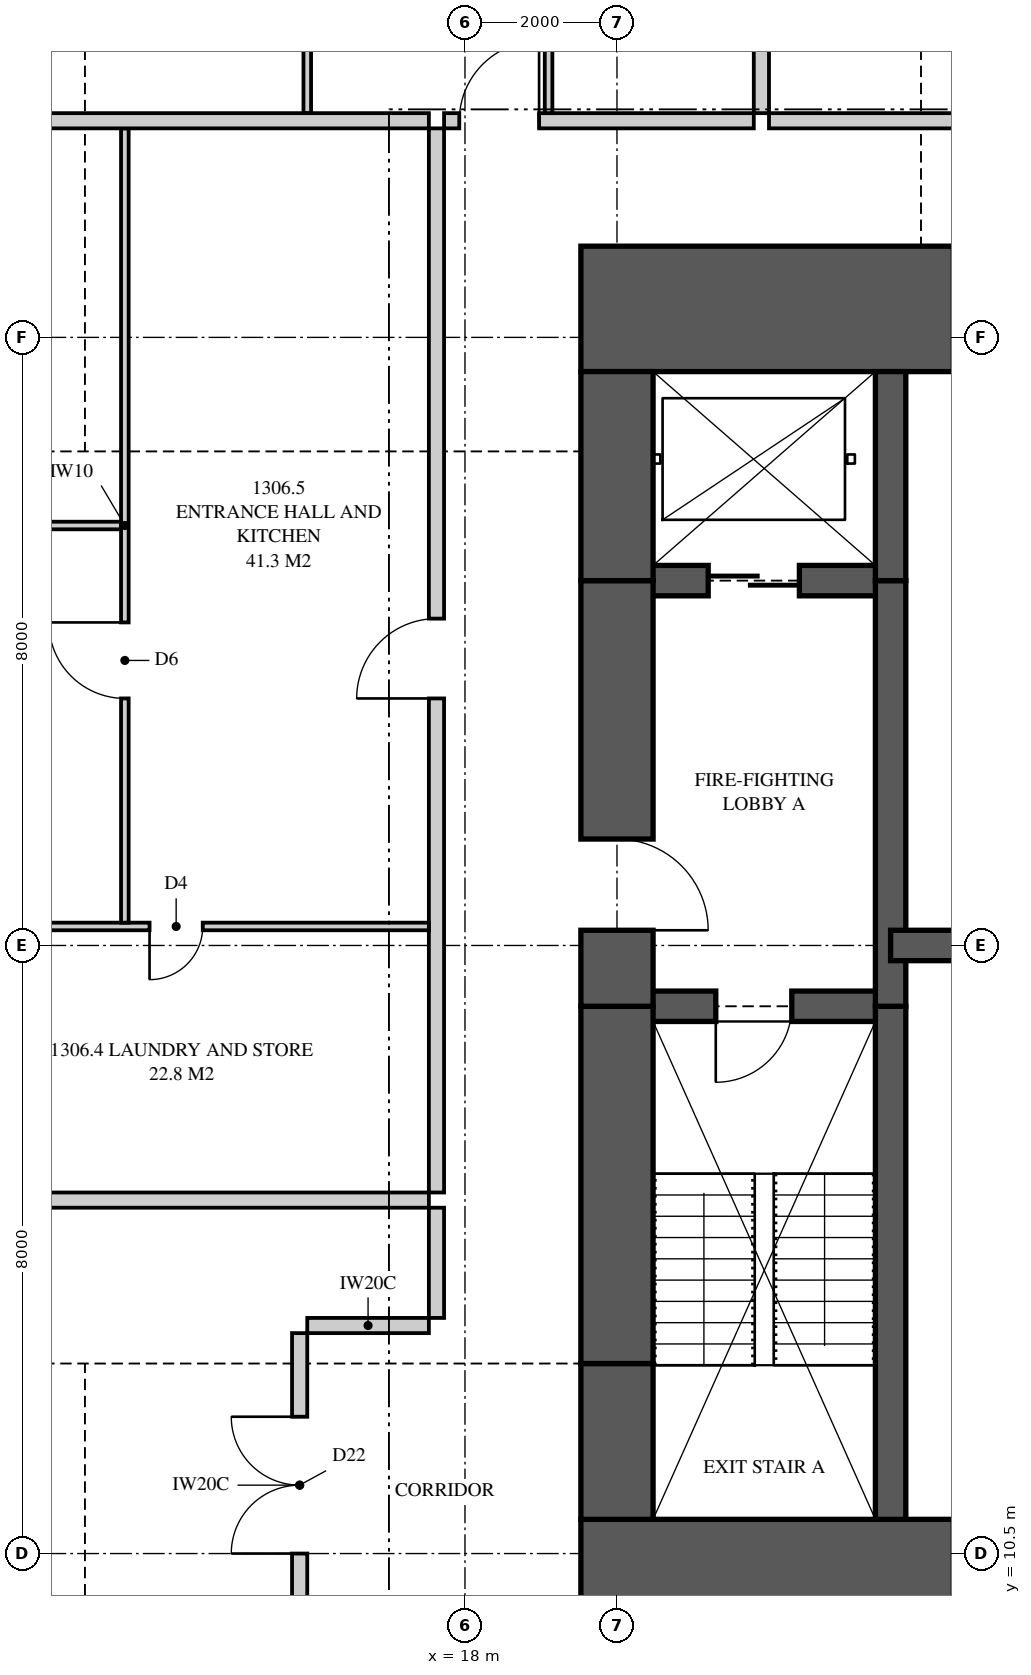
"""IFC4 building model, lengths in metres.
Left out: names, types, materials, properties, quantities, classifications, styles, units other than length and angle.
Written with IfcOpenShell. Run it as: python <this file> out.ifc"""

import sys

from ifc_helpers import new_model, si_unit, direction, frame, frame_2d, origin, place, context, subcontext, project, spatial, polyline, rectangle, outline, extrude, element, fill, save


model = new_model("IFC4")
c1 = context("Model", 3, precision=1e-05, world=origin(), true_north=direction((0.0, 1.0)))
c2 = subcontext(c1, "Body", "Model", "MODEL_VIEW")
j1 = project(units=[si_unit("LENGTHUNIT", "METRE"), si_unit("PLANEANGLEUNIT", "RADIAN")], contexts=[c1])
p1 = place(None, origin())
s1 = spatial("IfcSite", under=j1, at=p1, CompositionType="ELEMENT")
p2 = place(p1, origin())
s2 = spatial("IfcBuilding", under=s1, at=p2, CompositionType="ELEMENT")
p3 = place(p2, frame((0.0, 0.0, 51.15)))
s3 = spatial("IfcBuildingStorey", under=s2, at=p3, CompositionType="ELEMENT", Elevation=51.15)
p4 = place(p3, frame((19.525, 10.125, 0.0), z_axis=(0.0, 0.0, 1.0), x_axis=(1.0, 0.0, 0.0)))
e1 = element("IfcWall", 1, at=p4, inside=s3, PredefinedType="SHEAR", context=c2, shape_type="SweptSolid", body=[
    extrude(rectangle(XDim=6.475, YDim=1.65, at=frame_2d((3.238, 0.0))), origin(), (0.0, 0.0, 1.0), 3.35),
])
p5 = place(p4, frame((4.9, 0.0, 0.0)))
e2 = element("IfcOpeningElement", 2, at=p5, cuts=e1, PredefinedType="OPENING", context=c2, shape_type="SweptSolid", body=[
    extrude(rectangle(XDim=0.75, YDim=2.1, at=frame_2d((0.375, 1.05))), frame((0.0, 0.835, 0.0), z_axis=(0.0, -1.0, 0.0), x_axis=(1.0, 0.0, 0.0)), (0.0, 0.0, 1.0), 1.67),
])
p6 = place(p3, frame((26.0, 26.875, 0.0), z_axis=(0.0, 0.0, 1.0), x_axis=(-1.0, 0.0, 0.0)))
e3 = element("IfcWall", 3, at=p6, inside=s3, PredefinedType="SHEAR", context=c2, shape_type="SweptSolid", body=[
    extrude(rectangle(XDim=6.475, YDim=1.65, at=frame_2d((3.238, 0.0))), origin(), (0.0, 0.0, 1.0), 3.35),
])
p7 = place(p6, frame((0.825, 0.0, 0.0)))
e4 = element("IfcOpeningElement", 4, at=p7, cuts=e3, PredefinedType="OPENING", context=c2, shape_type="SweptSolid", body=[
    extrude(rectangle(XDim=0.75, YDim=2.1, at=frame_2d((0.375, 1.05))), frame((0.0, 0.835, 0.0), z_axis=(0.0, -1.0, 0.0), x_axis=(1.0, 0.0, 0.0)), (0.0, 0.0, 1.0), 1.67),
])
p8 = place(p3, frame((20.0, 26.05, 0.0), z_axis=(0.0, 0.0, 1.0), x_axis=(0.0, -1.0, 0.0)))
e5 = element("IfcWall", 5, at=p8, inside=s3, PredefinedType="SHEAR", context=c2, shape_type="SweptSolid", body=[
    extrude(rectangle(XDim=2.75, YDim=0.95, at=frame_2d((1.375, 0.0))), origin(), (0.0, 0.0, 1.0), 3.35),
])
p9 = place(p3, frame((20.0, 23.3, 0.0), z_axis=(0.0, 0.0, 1.0), x_axis=(0.0, -1.0, 0.0)))
e6 = element("IfcWall", 6, at=p9, inside=s3, PredefinedType="SHEAR", context=c2, shape_type="SweptSolid", body=[
    extrude(rectangle(XDim=5.6, YDim=0.95, at=frame_2d((2.8, 0.0))), origin(), (0.0, 0.0, 1.0), 3.35),
])
p10 = place(p9, frame((3.4, 0.0, 0.0)))
e7 = element("IfcOpeningElement", 7, at=p10, cuts=e6, PredefinedType="OPENING", context=c2, shape_type="SweptSolid", body=[
    extrude(rectangle(XDim=1.2, YDim=2.2, at=frame_2d((0.6, 1.1))), frame((0.0, 0.485, 0.0), z_axis=(0.0, -1.0, 0.0), x_axis=(1.0, 0.0, 0.0)), (0.0, 0.0, 1.0), 0.97),
])
p11 = place(p3, frame((20.0, 17.7, 0.0), z_axis=(0.0, 0.0, 1.0), x_axis=(0.0, -1.0, 0.0)))
e8 = element("IfcWall", 8, at=p11, inside=s3, PredefinedType="SHEAR", context=c2, shape_type="SweptSolid", body=[
    extrude(rectangle(XDim=4.7, YDim=0.95, at=frame_2d((2.35, 0.0))), origin(), (0.0, 0.0, 1.0), 3.35),
])
p12 = place(p3, frame((20.0, 13.0, 0.0), z_axis=(0.0, 0.0, 1.0), x_axis=(0.0, -1.0, 0.0)))
e9 = element("IfcWall", 9, at=p12, inside=s3, PredefinedType="SHEAR", context=c2, shape_type="SweptSolid", body=[
    extrude(rectangle(XDim=2.05, YDim=0.95, at=frame_2d((1.025, 0.0))), origin(), (0.0, 0.0, 1.0), 3.35),
])
p13 = place(p3, frame((23.6, 10.95, 0.0), z_axis=(0.0, 0.0, 1.0), x_axis=(0.0, 1.0, 0.0)))
e10 = element("IfcWall", 10, at=p13, inside=s3, PredefinedType="SHEAR", context=c2, shape_type="SweptSolid", body=[
    extrude(rectangle(XDim=6.75, YDim=0.4, at=frame_2d((3.375, 0.0))), origin(), (0.0, 0.0, 1.0), 3.35),
])
p14 = place(p3, frame((23.6, 17.7, 0.0), z_axis=(0.0, 0.0, 1.0), x_axis=(0.0, 1.0, 0.0)))
e11 = element("IfcWall", 11, at=p14, inside=s3, PredefinedType="SHEAR", context=c2, shape_type="SweptSolid", body=[
    extrude(rectangle(XDim=5.6, YDim=0.4, at=frame_2d((2.8, 0.0))), origin(), (0.0, 0.0, 1.0), 3.35),
])
p15 = place(p3, frame((23.6, 23.3, 0.0), z_axis=(0.0, 0.0, 1.0), x_axis=(0.0, 1.0, 0.0)))
e12 = element("IfcWall", 12, at=p15, inside=s3, PredefinedType="SHEAR", context=c2, shape_type="SweptSolid", body=[
    extrude(rectangle(XDim=2.75, YDim=0.4, at=frame_2d((1.375, 0.0))), origin(), (0.0, 0.0, 1.0), 3.35),
])
p16 = place(p3, frame((20.0, 17.7, 0.0), z_axis=(0.0, 0.0, 1.0), x_axis=(1.0, 0.0, 0.0)))
e13 = element("IfcWall", 13, at=p16, inside=s3, PredefinedType="SHEAR", context=c2, shape_type="SweptSolid", body=[
    extrude(rectangle(XDim=3.6, YDim=0.4, at=frame_2d((1.8, 0.0))), origin(), (0.0, 0.0, 1.0), 3.35),
])
p17 = place(p16, frame((1.3, 0.0, 0.0)))
e14 = element("IfcOpeningElement", 14, at=p17, cuts=e13, PredefinedType="OPENING", context=c2, shape_type="SweptSolid", body=[
    extrude(rectangle(XDim=1.0, YDim=2.1, at=frame_2d((0.5, 1.05))), frame((0.0, 0.21, 0.0), z_axis=(0.0, -1.0, 0.0), x_axis=(1.0, 0.0, 0.0)), (0.0, 0.0, 1.0), 0.42),
])
p18 = place(p3, frame((20.0, 23.3, 0.0), z_axis=(0.0, 0.0, 1.0), x_axis=(1.0, 0.0, 0.0)))
e15 = element("IfcWall", 15, at=p18, inside=s3, PredefinedType="SHEAR", context=c2, shape_type="SweptSolid", body=[
    extrude(rectangle(XDim=3.6, YDim=0.4, at=frame_2d((1.8, 0.0))), origin(), (0.0, 0.0, 1.0), 3.35),
])
p19 = place(p18, frame((1.2, 0.0, 0.0)))
e16 = element("IfcOpeningElement", 16, at=p19, cuts=e15, PredefinedType="OPENING", context=c2, shape_type="SweptSolid", body=[
    extrude(rectangle(XDim=1.2, YDim=2.1, at=frame_2d((0.6, 1.05))), frame((0.0, 0.21, 0.0), z_axis=(0.0, -1.0, 0.0), x_axis=(1.0, 0.0, 0.0)), (0.0, 0.0, 1.0), 0.42),
])
p20 = place(p3, frame((23.6, 18.5, 0.0), z_axis=(0.0, 0.0, 1.0), x_axis=(1.0, 0.0, 0.0)))
e17 = element("IfcWall", 17, at=p20, inside=s3, PredefinedType="SHEAR", context=c2, shape_type="SweptSolid", body=[
    extrude(rectangle(XDim=2.4, YDim=0.4, at=frame_2d((1.2, 0.0))), origin(), (0.0, 0.0, 1.0), 3.35),
])
p21 = place(p3, frame((21.9, 37.825, 0.0), z_axis=(0.0, 0.0, 1.0), x_axis=(0.0, -1.0, 0.0)))
e18 = element("IfcWall", 18, at=p21, inside=s3, PredefinedType="PARTITIONING", context=c2, shape_type="SweptSolid", body=[
    extrude(outline(polyline([(0.529, 2.15), (0.0, 2.15), (0.0, 0.0), (0.529, 0.0), (0.529, 0.069), (1.021, 0.069), (1.021, 0.0), (8.375, 0.0), (8.375, 3.11), (1.685, 3.11), (1.685, 2.15), (1.021, 2.15), (1.021, 2.082), (0.529, 2.082), (0.529, 2.15)])), frame((0.0, 0.1, 0.0), z_axis=(0.0, -1.0, 0.0), x_axis=(1.0, 0.0, 0.0)), (0.0, 0.0, 1.0), 0.2),
])
p22 = place(p3, frame((17.725, 29.35, 0.0), z_axis=(0.0, 0.0, 1.0), x_axis=(1.0, 0.0, 0.0)))
e19 = element("IfcWall", 19, at=p22, inside=s3, PredefinedType="PARTITIONING", context=c2, shape_type="SweptSolid", body=[
    extrude(rectangle(XDim=4.075, YDim=0.2, at=frame_2d((2.038, 0.0))), origin(), (0.0, 0.0, 1.0), 3.11),
])
p23 = place(p22, frame((0.2, 0.0, 0.0)))
e20 = element("IfcOpeningElement", 20, at=p23, cuts=e19, PredefinedType="OPENING", context=c2, shape_type="SweptSolid", body=[
    extrude(rectangle(XDim=1.05, YDim=2.2, at=frame_2d((0.525, 1.1))), frame((0.0, 0.11, 0.0), z_axis=(0.0, -1.0, 0.0), x_axis=(1.0, 0.0, 0.0)), (0.0, 0.0, 1.0), 0.22),
])
p24 = place(p3, frame((19.1, 32.4, 0.0), z_axis=(0.0, 0.0, 1.0), x_axis=(0.0, -1.0, 0.0)))
e21 = element("IfcWall", 21, at=p24, inside=s3, PredefinedType="PARTITIONING", context=c2, shape_type="SweptSolid", body=[
    extrude(rectangle(XDim=2.95, YDim=0.1, at=frame_2d((1.475, 0.0))), origin(), (0.0, 0.0, 1.0), 3.11),
])
p25 = place(p3, frame((15.925, 37.825, 0.0), z_axis=(0.0, 0.0, 1.0), x_axis=(0.0, -1.0, 0.0)))
e22 = element("IfcWall", 22, at=p25, inside=s3, PredefinedType="PARTITIONING", context=c2, shape_type="SweptSolid", body=[
    extrude(outline(polyline([(0.0, 0.0), (8.375, 0.0), (8.375, 3.11), (1.635, 3.11), (1.635, 2.15), (0.0, 2.15), (0.0, 3.11), (0.0, 0.0)])), frame((0.0, 0.05, 0.0), z_axis=(0.0, -1.0, 0.0), x_axis=(1.0, 0.0, 0.0)), (0.0, 0.0, 1.0), 0.1),
])
p26 = place(p25, frame((3.688, 0.0, 0.0)))
e23 = element("IfcOpeningElement", 23, at=p26, cuts=e22, PredefinedType="OPENING", context=c2, shape_type="SweptSolid", body=[
    extrude(rectangle(XDim=1.0, YDim=2.1, at=frame_2d((0.5, 1.05))), frame((0.0, 0.06, 0.0), z_axis=(0.0, -1.0, 0.0), x_axis=(1.0, 0.0, 0.0)), (0.0, 0.0, 1.0), 0.12),
])
p27 = place(p3, frame((22.0, 29.35, 0.0), z_axis=(0.0, 0.0, 1.0), x_axis=(1.0, 0.0, 0.0)))
e24 = element("IfcWall", 24, at=p27, inside=s3, PredefinedType="PARTITIONING", context=c2, shape_type="SweptSolid", body=[
    extrude(outline(polyline([(0.0, 0.0), (5.9, 0.0), (5.9, 3.11), (2.337, 3.11), (2.337, 2.541), (1.663, 2.541), (1.663, 3.11), (0.0, 3.11), (0.0, 0.0)])), frame((0.0, 0.1, 0.0), z_axis=(0.0, -1.0, 0.0), x_axis=(1.0, 0.0, 0.0)), (0.0, 0.0, 1.0), 0.2),
])
p28 = place(p3, frame((2.0, 29.35, 0.0), z_axis=(0.0, 0.0, 1.0), x_axis=(1.0, 0.0, 0.0)))
e25 = element("IfcWall", 25, at=p28, inside=s3, PredefinedType="PARTITIONING", context=c2, shape_type="SweptSolid", body=[
    extrude(outline(polyline([(0.0, 0.0), (15.525, 0.0), (15.525, 3.11), (11.337, 3.11), (11.337, 2.541), (10.663, 2.541), (10.663, 3.11), (9.51, 3.11), (9.51, 2.51), (6.89, 2.51), (6.89, 3.11), (2.969, 3.11), (2.969, 2.541), (2.577, 2.541), (2.577, 2.15), (0.733, 2.15), (0.733, 3.11), (0.0, 3.11), (0.0, 0.0)])), frame((0.0, 0.1, 0.0), z_axis=(0.0, -1.0, 0.0), x_axis=(1.0, 0.0, 0.0)), (0.0, 0.0, 1.0), 0.2),
])
p29 = place(p3, frame((2.175, 15.15, 0.0), z_axis=(0.0, 0.0, 1.0), x_axis=(1.0, 0.0, 0.0)))
e26 = element("IfcWall", 26, at=p29, inside=s3, PredefinedType="PARTITIONING", context=c2, shape_type="SweptSolid", body=[
    extrude(outline(polyline([(0.529, 2.15), (0.0, 2.15), (0.0, 0.0), (0.529, 0.0), (0.529, 0.034), (1.021, 0.034), (1.021, 0.0), (15.35, 0.0), (15.35, 3.11), (9.335, 3.11), (9.335, 2.51), (6.715, 2.51), (6.715, 3.11), (1.685, 3.11), (1.685, 2.15), (1.021, 2.15), (1.021, 2.116), (0.529, 2.116), (0.529, 2.15)])), frame((0.0, 0.1, 0.0), z_axis=(0.0, -1.0, 0.0), x_axis=(1.0, 0.0, 0.0)), (0.0, 0.0, 1.0), 0.2),
])
p30 = place(p3, frame((17.625, 15.25, 0.0), z_axis=(0.0, 0.0, 1.0), x_axis=(0.0, 1.0, 0.0)))
e27 = element("IfcWall", 27, at=p30, inside=s3, PredefinedType="PARTITIONING", context=c2, shape_type="SweptSolid", body=[
    extrude(outline(polyline([(0.0, 0.0), (14.0, 0.0), (14.0, 3.11), (10.087, 3.11), (10.087, 2.541), (9.413, 2.541), (9.413, 3.11), (0.0, 3.11), (0.0, 0.0)])), frame((0.0, 0.1, 0.0), z_axis=(0.0, -1.0, 0.0), x_axis=(1.0, 0.0, 0.0)), (0.0, 0.0, 1.0), 0.2),
])
p31 = place(p30, frame((6.5, 0.0, 0.0)))
e28 = element("IfcOpeningElement", 28, at=p31, cuts=e27, PredefinedType="OPENING", context=c2, shape_type="SweptSolid", body=[
    extrude(rectangle(XDim=1.05, YDim=2.2, at=frame_2d((0.525, 1.1))), frame((0.0, 0.11, 0.0), z_axis=(0.0, -1.0, 0.0), x_axis=(1.0, 0.0, 0.0)), (0.0, 0.0, 1.0), 0.22),
])
p32 = place(p3, frame((2.175, 18.75, 0.0), z_axis=(0.0, 0.0, 1.0), x_axis=(1.0, 0.0, 0.0)))
e29 = element("IfcWall", 29, at=p32, inside=s3, PredefinedType="PARTITIONING", context=c2, shape_type="SweptSolid", body=[
    extrude(outline(polyline([(0.0, 0.0), (15.35, 0.0), (15.35, 3.11), (9.285, 3.11), (9.285, 2.51), (6.765, 2.51), (6.765, 3.11), (1.635, 3.11), (1.635, 2.15), (0.0, 2.15), (0.0, 3.11), (0.0, 0.0)])), frame((0.0, 0.05, 0.0), z_axis=(0.0, -1.0, 0.0), x_axis=(1.0, 0.0, 0.0)), (0.0, 0.0, 1.0), 0.1),
])
p33 = place(p32, frame((4.85, 0.0, 0.0)))
e30 = element("IfcOpeningElement", 30, at=p33, cuts=e29, PredefinedType="OPENING", context=c2, shape_type="SweptSolid", body=[
    extrude(rectangle(XDim=0.9, YDim=2.1, at=frame_2d((0.45, 1.05))), frame((0.0, 0.06, 0.0), z_axis=(0.0, -1.0, 0.0), x_axis=(1.0, 0.0, 0.0)), (0.0, 0.0, 1.0), 0.12),
])
p34 = place(p32, frame((11.675, 0.0, 0.0)))
e31 = element("IfcOpeningElement", 31, at=p34, cuts=e29, PredefinedType="OPENING", context=c2, shape_type="SweptSolid", body=[
    extrude(rectangle(XDim=0.7, YDim=2.1, at=frame_2d((0.35, 1.05))), frame((0.0, 0.06, 0.0), z_axis=(0.0, -1.0, 0.0), x_axis=(1.0, 0.0, 0.0)), (0.0, 0.0, 1.0), 0.12),
])
p35 = place(p3, frame((13.525, 18.8, 0.0), z_axis=(0.0, 0.0, 1.0), x_axis=(0.0, 1.0, 0.0)))
e32 = element("IfcWall", 32, at=p35, inside=s3, PredefinedType="PARTITIONING", context=c2, shape_type="SweptSolid", body=[
    extrude(outline(polyline([(0.0, 0.0), (10.45, 0.0), (10.45, 3.11), (6.487, 3.11), (6.487, 2.541), (5.913, 2.541), (5.913, 3.11), (0.0, 3.11), (0.0, 0.0)])), frame((0.0, 0.05, 0.0), z_axis=(0.0, -1.0, 0.0), x_axis=(1.0, 0.0, 0.0)), (0.0, 0.0, 1.0), 0.1),
])
p36 = place(p35, frame((2.95, 0.0, 0.0)))
e33 = element("IfcOpeningElement", 33, at=p36, cuts=e32, PredefinedType="OPENING", context=c2, shape_type="SweptSolid", body=[
    extrude(rectangle(XDim=1.0, YDim=2.1, at=frame_2d((0.5, 1.05))), frame((0.0, 0.06, 0.0), z_axis=(0.0, -1.0, 0.0), x_axis=(1.0, 0.0, 0.0)), (0.0, 0.0, 1.0), 0.12),
])
p37 = place(p3, frame((2.175, 24.025, 0.0), z_axis=(0.0, 0.0, 1.0), x_axis=(1.0, 0.0, 0.0)))
e34 = element("IfcWall", 34, at=p37, inside=s3, PredefinedType="PARTITIONING", context=c2, shape_type="SweptSolid", body=[
    extrude(outline(polyline([(0.529, 2.15), (0.0, 2.15), (0.0, 0.0), (0.529, 0.0), (0.529, 0.803), (1.021, 0.803), (1.021, 0.0), (11.3, 0.0), (11.3, 3.11), (9.285, 3.11), (9.285, 2.51), (6.765, 2.51), (6.765, 3.11), (1.635, 3.11), (1.635, 2.15), (1.021, 2.15), (1.021, 1.347), (0.529, 1.347), (0.529, 2.15)])), frame((0.0, 0.05, 0.0), z_axis=(0.0, -1.0, 0.0), x_axis=(1.0, 0.0, 0.0)), (0.0, 0.0, 1.0), 0.1),
])
p38 = place(p37, frame((5.15, 0.0, 0.0)))
e35 = element("IfcOpeningElement", 35, at=p38, cuts=e34, PredefinedType="OPENING", context=c2, shape_type="SweptSolid", body=[
    extrude(rectangle(XDim=1.0, YDim=2.1, at=frame_2d((0.5, 1.05))), frame((0.0, 0.06, 0.0), z_axis=(0.0, -1.0, 0.0), x_axis=(1.0, 0.0, 0.0)), (0.0, 0.0, 1.0), 0.12),
])
p39 = place(p3, frame((17.625, 13.6, 0.0), z_axis=(0.0, 0.0, 1.0), x_axis=(0.0, 1.0, 0.0)))
e36 = element("IfcWall", 36, at=p39, inside=s3, PredefinedType="PARTITIONING", context=c2, shape_type="SweptSolid", body=[
    extrude(rectangle(XDim=1.45, YDim=0.2, at=frame_2d((0.725, 0.0))), origin(), (0.0, 0.0, 1.0), 3.11),
])
p40 = place(p3, frame((15.825, 9.4, 0.0), z_axis=(0.0, 0.0, 1.0), x_axis=(0.0, 1.0, 0.0)))
e37 = element("IfcWall", 37, at=p40, inside=s3, PredefinedType="PARTITIONING", context=c2, shape_type="SweptSolid", body=[
    extrude(outline(polyline([(0.0, 0.0), (4.0, 0.0), (4.0, 3.11), (3.937, 3.11), (3.937, 2.541), (3.263, 2.541), (3.263, 3.11), (0.0, 3.11), (0.0, 0.0)])), frame((0.0, 0.1, 0.0), z_axis=(0.0, -1.0, 0.0), x_axis=(1.0, 0.0, 0.0)), (0.0, 0.0, 1.0), 0.2),
])
p41 = place(p40, frame((1.1, 0.0, 0.0)))
e38 = element("IfcOpeningElement", 38, at=p41, cuts=e37, PredefinedType="OPENING", context=c2, shape_type="SweptSolid", body=[
    extrude(rectangle(XDim=1.8, YDim=2.1, at=frame_2d((0.9, 1.05))), frame((0.0, 0.11, 0.0), z_axis=(0.0, -1.0, 0.0), x_axis=(1.0, 0.0, 0.0)), (0.0, 0.0, 1.0), 0.22),
])
p42 = place(p3, frame((17.525, 13.5, 0.0), z_axis=(0.0, 0.0, 1.0), x_axis=(-1.0, 0.0, 0.0)))
e39 = element("IfcWall", 39, at=p42, inside=s3, PredefinedType="PARTITIONING", context=c2, shape_type="SweptSolid", body=[
    extrude(rectangle(XDim=1.6, YDim=0.2, at=frame_2d((0.8, 0.0))), origin(), (0.0, 0.0, 1.0), 3.11),
])
p43 = place(p23, origin())
e40 = element("IfcDoor", 40, at=p43, inside=s3, OperationType="SINGLE_SWING_RIGHT", PredefinedType="DOOR", context=c2, shape_type="SweptSolid", body=[
    extrude(rectangle(XDim=1.05, YDim=2.2, at=frame_2d((0.525, 1.1))), frame((0.0, 0.025, 0.0), z_axis=(0.0, -1.0, 0.0), x_axis=(1.0, 0.0, 0.0)), (0.0, 0.0, 1.0), 0.05),
])
fill(e20, e40)
p44 = place(p41, origin())
e41 = element("IfcDoor", 41, at=p44, inside=s3, OperationType="DOUBLE_DOOR_SINGLE_SWING", PredefinedType="DOOR", context=c2, shape_type="SweptSolid", body=[
    extrude(rectangle(XDim=1.8, YDim=2.1, at=frame_2d((0.9, 1.05))), frame((0.0, 0.025, 0.0), z_axis=(0.0, -1.0, 0.0), x_axis=(1.0, 0.0, 0.0)), (0.0, 0.0, 1.0), 0.05),
])
fill(e38, e41)
p45 = place(p31, origin())
e42 = element("IfcDoor", 42, at=p45, inside=s3, OperationType="SINGLE_SWING_LEFT", PredefinedType="DOOR", context=c2, shape_type="SweptSolid", body=[
    extrude(rectangle(XDim=1.05, YDim=2.2, at=frame_2d((0.525, 1.1))), frame((0.0, 0.025, 0.0), z_axis=(0.0, -1.0, 0.0), x_axis=(1.0, 0.0, 0.0)), (0.0, 0.0, 1.0), 0.05),
])
fill(e28, e42)
p46 = place(p34, frame((0.7, 0.0, 0.0), z_axis=(0.0, 0.0, 1.0), x_axis=(-1.0, 0.0, 0.0)))
e43 = element("IfcDoor", 43, at=p46, inside=s3, OperationType="SINGLE_SWING_RIGHT", PredefinedType="DOOR", context=c2, shape_type="SweptSolid", body=[
    extrude(rectangle(XDim=0.7, YDim=2.1, at=frame_2d((0.35, 1.05))), frame((0.0, 0.025, 0.0), z_axis=(0.0, -1.0, 0.0), x_axis=(1.0, 0.0, 0.0)), (0.0, 0.0, 1.0), 0.05),
])
fill(e31, e43)
p47 = place(p36, origin())
e44 = element("IfcDoor", 44, at=p47, inside=s3, OperationType="SINGLE_SWING_RIGHT", PredefinedType="DOOR", context=c2, shape_type="SweptSolid", body=[
    extrude(rectangle(XDim=1.0, YDim=2.1, at=frame_2d((0.5, 1.05))), frame((0.0, 0.025, 0.0), z_axis=(0.0, -1.0, 0.0), x_axis=(1.0, 0.0, 0.0)), (0.0, 0.0, 1.0), 0.05),
])
fill(e33, e44)
p48 = place(p17, frame((1.0, 0.0, 0.0), z_axis=(0.0, 0.0, 1.0), x_axis=(-1.0, 0.0, 0.0)))
e45 = element("IfcDoor", 45, at=p48, inside=s3, OperationType="SINGLE_SWING_RIGHT", PredefinedType="DOOR", context=c2, shape_type="SweptSolid", body=[
    extrude(rectangle(XDim=1.0, YDim=2.1, at=frame_2d((0.5, 1.05))), frame((0.0, 0.025, 0.0), z_axis=(0.0, -1.0, 0.0), x_axis=(1.0, 0.0, 0.0)), (0.0, 0.0, 1.0), 0.05),
])
fill(e14, e45)
p49 = place(p10, origin())
e46 = element("IfcDoor", 46, at=p49, inside=s3, OperationType="SINGLE_SWING_RIGHT", PredefinedType="DOOR", context=c2, shape_type="SweptSolid", body=[
    extrude(rectangle(XDim=1.2, YDim=2.2, at=frame_2d((0.6, 1.1))), frame((0.0, 0.025, 0.0), z_axis=(0.0, -1.0, 0.0), x_axis=(1.0, 0.0, 0.0)), (0.0, 0.0, 1.0), 0.05),
])
fill(e7, e46)
p50 = place(p19, origin())
e47 = element("IfcDoor", 47, at=p50, inside=s3, OperationType="SLIDING_TO_LEFT", PredefinedType="DOOR", context=c2, shape_type="SweptSolid", body=[
    extrude(rectangle(XDim=1.2, YDim=2.1, at=frame_2d((0.6, 1.05))), frame((0.0, 0.025, 0.0), z_axis=(0.0, -1.0, 0.0), x_axis=(1.0, 0.0, 0.0)), (0.0, 0.0, 1.0), 0.05),
])
fill(e16, e47)
save(model, sys.argv[1])
